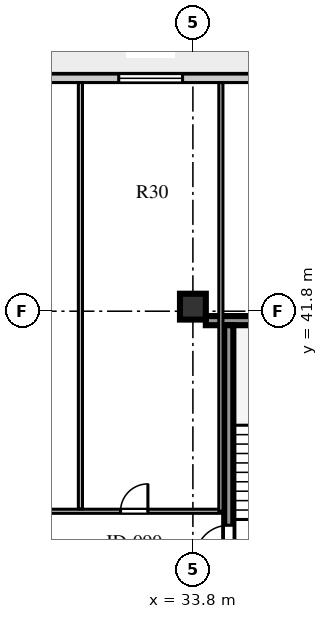
"""IFC4 building model, lengths in metres.
Left out: names, types, materials, properties, quantities, classifications, styles, units other than length and angle.
Written with IfcOpenShell. Run it as: python <this file> out.ifc"""

import sys

from ifc_helpers import new_model, si_unit, direction, frame, frame_2d, origin, origin_2d, place, context, subcontext, project, spatial, rectangle, extrude, element, fill, save


model = new_model("IFC4")
c1 = context("Model", 3, precision=1e-05, world=origin(), true_north=direction((0.0, 1.0)))
c2 = subcontext(c1, "Body", "Model", "MODEL_VIEW")
j1 = project(units=[si_unit("LENGTHUNIT", "METRE"), si_unit("PLANEANGLEUNIT", "RADIAN")], contexts=[c1])
p1 = place(None, origin())
s1 = spatial("IfcSite", under=j1, at=p1, CompositionType="ELEMENT")
p2 = place(p1, origin())
s2 = spatial("IfcBuilding", under=s1, at=p2, CompositionType="ELEMENT")
p3 = place(p2, frame((0.0, 0.0, 229.7)))
s3 = spatial("IfcBuildingStorey", under=s2, at=p3, CompositionType="ELEMENT", Elevation=229.7)
p4 = place(p3, frame((34.225, 41.49, 0.0), z_axis=(0.0, 0.0, 1.0), x_axis=(1.0, 0.0, 0.0)))
e1 = element("IfcWall", 1, at=p4, inside=s3, PredefinedType="SHEAR", context=c2, shape_type="SweptSolid", body=[
    extrude(rectangle(XDim=4.645, YDim=0.3, at=frame_2d((2.323, 0.0))), origin(), (0.0, 0.0, 1.0), 3.66),
])
p5 = place(p3, frame((34.98, 33.31, 0.0), z_axis=(0.0, 0.0, 1.0), x_axis=(0.0, 1.0, 0.0)))
e2 = element("IfcWall", 2, at=p5, inside=s3, PredefinedType="SHEAR", context=c2, shape_type="SweptSolid", body=[
    extrude(rectangle(XDim=8.03, YDim=0.3, at=frame_2d((4.015, 0.0))), origin(), (0.0, 0.0, 1.0), 3.66),
])
p6 = place(p5, frame((0.35, 0.0, 0.0)))
e3 = element("IfcOpeningElement", 3, at=p6, cuts=e2, PredefinedType="OPENING", context=c2, shape_type="SweptSolid", body=[
    extrude(rectangle(XDim=1.1, YDim=2.1, at=frame_2d((0.55, 1.05))), frame((0.0, 0.16, 0.0), z_axis=(0.0, -1.0, 0.0), x_axis=(1.0, 0.0, 0.0)), (0.0, 0.0, 1.0), 0.32),
])
p7 = place(p3, frame((33.8, 41.95, 0.0), z_axis=(0.0, 0.0, 1.0), x_axis=(1.0, 0.0, 0.0)))
e4 = element("IfcColumn", 4, at=p7, inside=s3, PredefinedType="COLUMN", context=c2, shape_type="SweptSolid", body=[
    extrude(rectangle(XDim=0.85, YDim=0.85, at=origin_2d()), origin(), (0.0, 0.0, 1.0), 3.66),
])
p8 = place(p3, frame((45.55, 49.46, 0.0), z_axis=(0.0, 0.0, 1.0), x_axis=(-1.0, 0.0, 0.0)))
e5 = element("IfcWall", 5, at=p8, inside=s3, PredefinedType="STANDARD", context=c2, shape_type="SweptSolid", body=[
    extrude(rectangle(XDim=32.5, YDim=0.28, at=frame_2d((16.25, 0.0))), origin(), (0.0, 0.0, 1.0), 3.66),
])
p9 = place(p8, frame((30.55, 0.0, 0.0)))
e6 = element("IfcOpeningElement", 6, at=p9, cuts=e5, PredefinedType="OPENING", context=c2, shape_type="SweptSolid", body=[
    extrude(rectangle(XDim=1.0, YDim=2.05, at=frame_2d((0.5, 1.025))), frame((0.0, 0.15, 0.0), z_axis=(0.0, -1.0, 0.0), x_axis=(1.0, 0.0, 0.0)), (0.0, 0.0, 1.0), 0.3),
])
p10 = place(p8, frame((24.865, 0.0, 0.8)))
e7 = element("IfcOpeningElement", 7, at=p10, cuts=e5, PredefinedType="OPENING", context=c2, shape_type="SweptSolid", body=[
    extrude(rectangle(XDim=1.2, YDim=1.75, at=frame_2d((0.6, 0.875))), frame((0.0, 0.15, 0.0), z_axis=(0.0, -1.0, 0.0), x_axis=(1.0, 0.0, 0.0)), (0.0, 0.0, 1.0), 0.3),
])
p11 = place(p8, frame((16.69, 0.0, 0.8)))
e8 = element("IfcOpeningElement", 8, at=p11, cuts=e5, PredefinedType="OPENING", context=c2, shape_type="SweptSolid", body=[
    extrude(rectangle(XDim=2.4, YDim=2.05, at=frame_2d((1.2, 1.025))), frame((0.0, 0.15, 0.0), z_axis=(0.0, -1.0, 0.0), x_axis=(1.0, 0.0, 0.0)), (0.0, 0.0, 1.0), 0.3),
])
p12 = place(p8, frame((12.09, 0.0, 0.8)))
e9 = element("IfcOpeningElement", 9, at=p12, cuts=e5, PredefinedType="OPENING", context=c2, shape_type="SweptSolid", body=[
    extrude(rectangle(XDim=2.1, YDim=1.95, at=frame_2d((1.05, 0.975))), frame((0.0, 0.15, 0.0), z_axis=(0.0, -1.0, 0.0), x_axis=(1.0, 0.0, 0.0)), (0.0, 0.0, 1.0), 0.3),
])
p13 = place(p8, frame((4.795, 0.0, 0.8)))
e10 = element("IfcOpeningElement", 10, at=p13, cuts=e5, PredefinedType="OPENING", context=c2, shape_type="SweptSolid", body=[
    extrude(rectangle(XDim=1.35, YDim=1.9, at=frame_2d((0.675, 0.95))), frame((0.0, 0.15, 0.0), z_axis=(0.0, -1.0, 0.0), x_axis=(1.0, 0.0, 0.0)), (0.0, 0.0, 1.0), 0.3),
])
p14 = place(p3, frame((25.22, 35.22, 0.0), z_axis=(0.0, 0.0, 1.0), x_axis=(1.0, 0.0, 0.0)))
e11 = element("IfcWall", 11, at=p14, inside=s3, PredefinedType="PARTITIONING", context=c2, shape_type="SweptSolid", body=[
    extrude(rectangle(XDim=9.5, YDim=0.135, at=frame_2d((4.75, 0.0))), origin(), (0.0, 0.0, 1.0), 3.66),
])
p15 = place(p14, frame((1.2, 0.0, 0.0)))
e12 = element("IfcOpeningElement", 12, at=p15, cuts=e11, PredefinedType="OPENING", context=c2, shape_type="SweptSolid", body=[
    extrude(rectangle(XDim=1.0, YDim=2.08, at=frame_2d((0.5, 1.04))), frame((0.0, 0.078, 0.0), z_axis=(0.0, -1.0, 0.0), x_axis=(1.0, 0.0, 0.0)), (0.0, 0.0, 1.0), 0.155),
])
p16 = place(p14, frame((6.2, 0.0, 0.0)))
e13 = element("IfcOpeningElement", 13, at=p16, cuts=e11, PredefinedType="OPENING", context=c2, shape_type="SweptSolid", body=[
    extrude(rectangle(XDim=0.9, YDim=2.08, at=frame_2d((0.45, 1.04))), frame((0.0, 0.078, 0.0), z_axis=(0.0, -1.0, 0.0), x_axis=(1.0, 0.0, 0.0)), (0.0, 0.0, 1.0), 0.155),
])
p17 = place(p3, frame((34.72, 35.22, 0.0), z_axis=(0.0, 0.0, 1.0), x_axis=(0.0, 1.0, 0.0)))
e14 = element("IfcWall", 14, at=p17, inside=s3, PredefinedType="PARTITIONING", context=c2, shape_type="SweptSolid", body=[
    extrude(rectangle(XDim=14.1, YDim=0.135, at=frame_2d((7.05, 0.0))), origin(), (0.0, 0.0, 1.0), 3.66),
])
p18 = place(p3, frame((30.1, 35.3, 0.0), z_axis=(0.0, 0.0, 1.0), x_axis=(0.0, 1.0, 0.0)))
e15 = element("IfcWall", 15, at=p18, inside=s3, PredefinedType="PARTITIONING", context=c2, shape_type="SweptSolid", body=[
    extrude(rectangle(XDim=14.02, YDim=0.135, at=frame_2d((7.01, 0.0))), origin(), (0.0, 0.0, 1.0), 3.66),
])
p19 = place(p12, origin())
e16 = element("IfcWindow", 16, at=p19, inside=s3, PartitioningType="SINGLE_PANEL", PredefinedType="WINDOW", context=c2, shape_type="SweptSolid", body=[
    extrude(rectangle(XDim=2.1, YDim=1.95, at=frame_2d((1.05, 0.975))), frame((0.0, 0.03, 0.0), z_axis=(0.0, -1.0, 0.0), x_axis=(1.0, 0.0, 0.0)), (0.0, 0.0, 1.0), 0.06),
])
fill(e9, e16)
p20 = place(p6, origin())
e17 = element("IfcDoor", 17, at=p20, inside=s3, OperationType="SINGLE_SWING_LEFT", PredefinedType="DOOR", context=c2, shape_type="SweptSolid", body=[
    extrude(rectangle(XDim=1.1, YDim=2.1, at=frame_2d((0.55, 1.05))), frame((0.0, 0.025, 0.0), z_axis=(0.0, -1.0, 0.0), x_axis=(1.0, 0.0, 0.0)), (0.0, 0.0, 1.0), 0.05),
])
fill(e3, e17)
p21 = place(p16, origin())
e18 = element("IfcDoor", 18, at=p21, inside=s3, OperationType="SINGLE_SWING_RIGHT", PredefinedType="DOOR", context=c2, shape_type="SweptSolid", body=[
    extrude(rectangle(XDim=0.9, YDim=2.08, at=frame_2d((0.45, 1.04))), frame((0.0, 0.025, 0.0), z_axis=(0.0, -1.0, 0.0), x_axis=(1.0, 0.0, 0.0)), (0.0, 0.0, 1.0), 0.05),
])
fill(e13, e18)
save(model, sys.argv[1])
